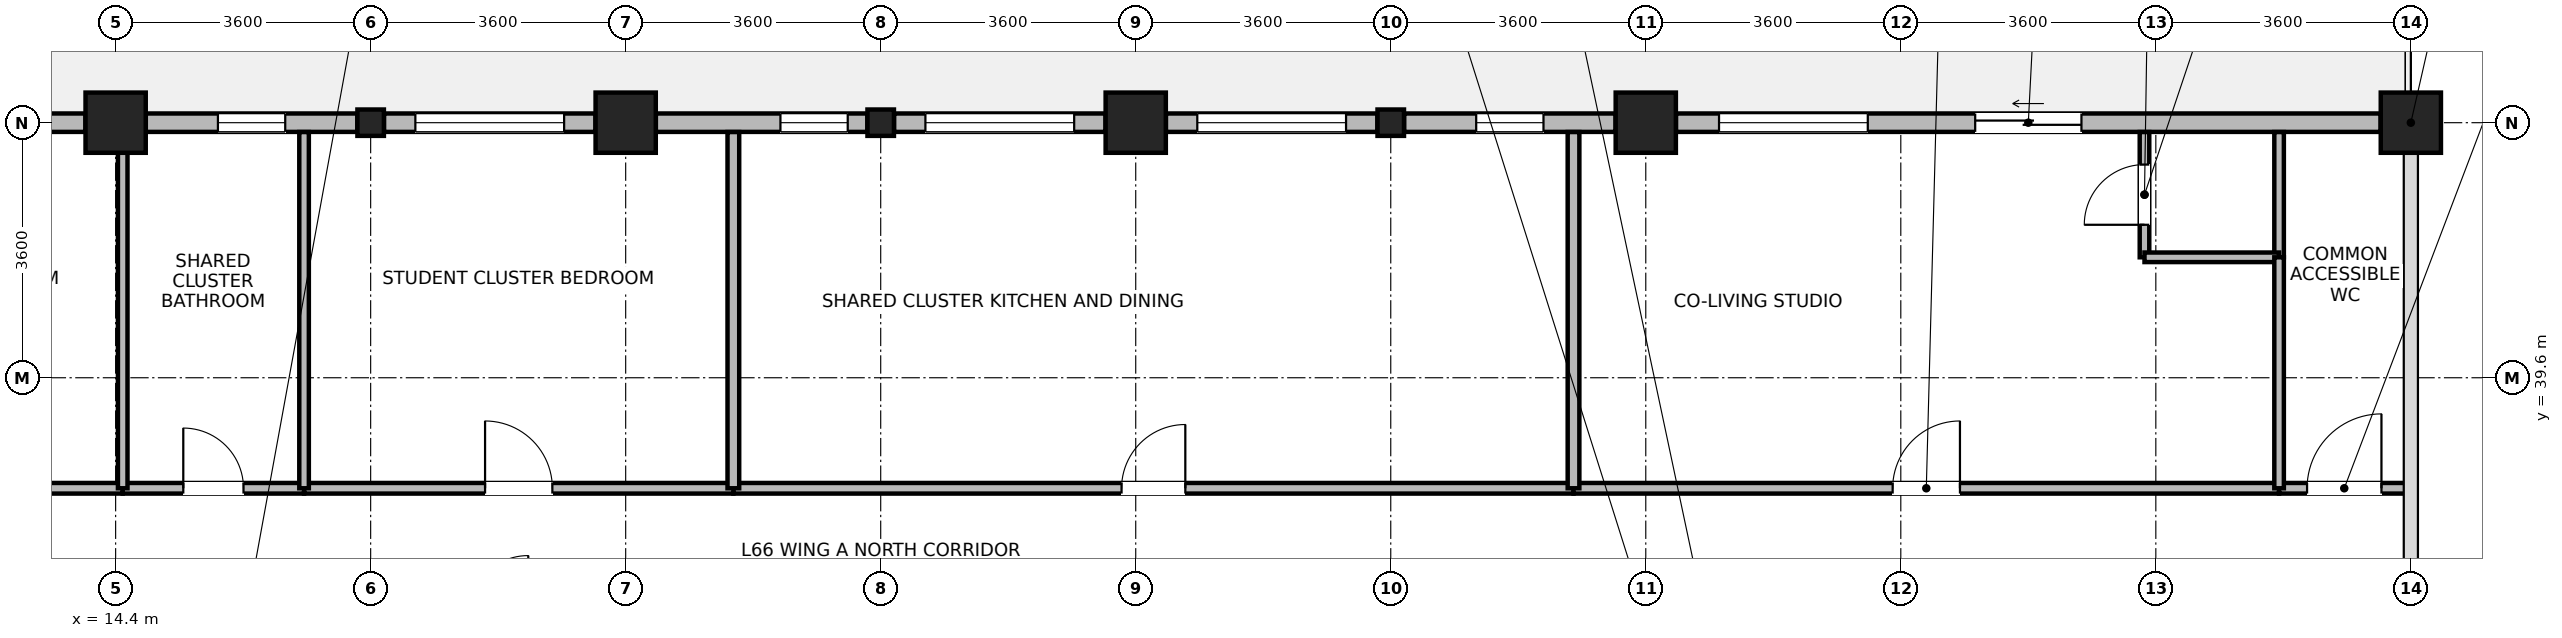
"""IFC4 building model, lengths in metres.
Left out: names, types, materials, properties, quantities, classifications, styles, units other than length and angle.
Written with IfcOpenShell. Run it as: python <this file> out.ifc"""

import sys

from ifc_helpers import new_model, si_unit, direction, frame, frame_2d, origin, origin_2d, place, context, subcontext, project, spatial, rectangle, i_section, extrude, source, transform, mapped, element, fill, save


model = new_model("IFC4")
c1 = context("Model", 3, precision=1e-05, world=origin(), true_north=direction((0.0, 1.0)))
c2 = subcontext(c1, "Body", "Model", "MODEL_VIEW")
j1 = project(units=[si_unit("LENGTHUNIT", "METRE"), si_unit("PLANEANGLEUNIT", "RADIAN")], contexts=[c1])
p1 = place(None, origin())
s1 = spatial("IfcSite", under=j1, at=p1, CompositionType="ELEMENT")
p2 = place(p1, origin())
s2 = spatial("IfcBuilding", under=s1, at=p2, CompositionType="ELEMENT")
p3 = place(p2, frame((0.0, 0.0, 257.3)))
s3 = spatial("IfcBuildingStorey", under=s2, at=p3, CompositionType="ELEMENT", Elevation=257.3)
m1 = source(origin(), c2, "Body", "SweptSolid", [
    extrude(rectangle(XDim=0.85, YDim=0.85, at=origin_2d()), origin(), (0.0, 0.0, 1.0), 3.7),
])
for number, where, z_axis, x_axis in (
    (1, (14.4, 43.2, 0.0), (0.0, 0.0, 1.0), (1.0, 0.0, 0.0)),
    (2, (21.6, 43.2, 0.0), (0.0, 0.0, 1.0), (1.0, 0.0, 0.0)),
    (3, (28.8, 43.2, 0.0), (0.0, 0.0, 1.0), (1.0, 0.0, 0.0)),
    (4, (36.0, 43.2, 0.0), (0.0, 0.0, 1.0), (1.0, 0.0, 0.0)),
    (5, (46.8, 43.2, 0.0), (0.0, 0.0, 1.0), (1.0, 0.0, 0.0)),
):
    element("IfcColumn", number, at=place(p3, frame(where, z_axis=z_axis, x_axis=x_axis)), inside=s3, PredefinedType="COLUMN", context=c2, shape_type="MappedRepresentation", body=[
        mapped(m1, transform((0.0, 0.0, 0.0), x_axis=(1.0, 0.0, 0.0), y_axis=(0.0, 1.0, 0.0), z_axis=(0.0, 0.0, 1.0), scale=1.0)),
    ])
m2 = source(origin(), c2, "Body", "SweptSolid", [
    extrude(i_section(OverallWidth=0.374, OverallDepth=0.372, WebThickness=0.015, FlangeThickness=0.026, FilletRadius=0.015, at=origin_2d()), origin(), (0.0, 0.0, 1.0), 3.7),
])
for number, where, z_axis, x_axis in (
    (6, (18.0, 43.2, 0.0), (0.0, 0.0, 1.0), (1.0, 0.0, 0.0)),
    (7, (25.2, 43.2, 0.0), (0.0, 0.0, 1.0), (1.0, 0.0, 0.0)),
    (8, (32.4, 43.2, 0.0), (0.0, 0.0, 1.0), (1.0, 0.0, 0.0)),
):
    element("IfcColumn", number, at=place(p3, frame(where, z_axis=z_axis, x_axis=x_axis)), inside=s3, PredefinedType="COLUMN", context=c2, shape_type="MappedRepresentation", body=[
        mapped(m2, transform((0.0, 0.0, 0.0), x_axis=(1.0, 0.0, 0.0), y_axis=(0.0, 1.0, 0.0), z_axis=(0.0, 0.0, 1.0), scale=1.0)),
    ])
p4 = place(p3, frame((36.426, 43.2, 0.0), z_axis=(0.0, 0.0, 1.0), x_axis=(1.0, 0.0, 0.0)))
e9 = element("IfcWall", 9, at=p4, inside=s3, PredefinedType="STANDARD", context=c2, shape_type="SweptSolid", body=[
    extrude(rectangle(XDim=9.948, YDim=0.26, at=frame_2d((4.974, 0.0))), origin(), (0.0, 0.0, 1.0), 3.055),
])
p5 = place(p4, frame((4.224, 0.0, 0.0)))
e10 = element("IfcOpeningElement", 10, at=p5, cuts=e9, PredefinedType="OPENING", context=c2, shape_type="SweptSolid", body=[
    extrude(rectangle(XDim=1.5, YDim=2.15, at=frame_2d((0.75, 1.075))), frame((0.0, 0.14, 0.0), z_axis=(0.0, -1.0, 0.0), x_axis=(1.0, 0.0, 0.0)), (0.0, 0.0, 1.0), 0.28),
])
p6 = place(p4, frame((0.608, 0.0, 0.85)))
e11 = element("IfcOpeningElement", 11, at=p6, cuts=e9, PredefinedType="OPENING", context=c2, shape_type="SweptSolid", body=[
    extrude(rectangle(XDim=2.1, YDim=1.95, at=frame_2d((1.05, 0.975))), frame((0.0, 0.14, 0.0), z_axis=(0.0, -1.0, 0.0), x_axis=(1.0, 0.0, 0.0)), (0.0, 0.0, 1.0), 0.28),
])
p7 = place(p3, frame((32.588, 43.2, 0.0), z_axis=(0.0, 0.0, 1.0), x_axis=(1.0, 0.0, 0.0)))
e12 = element("IfcWall", 12, at=p7, inside=s3, PredefinedType="STANDARD", context=c2, shape_type="SweptSolid", body=[
    extrude(rectangle(XDim=2.986, YDim=0.26, at=frame_2d((1.493, 0.0))), origin(), (0.0, 0.0, 1.0), 3.055),
])
p8 = place(p7, frame((1.018, 0.0, 0.85)))
e13 = element("IfcOpeningElement", 13, at=p8, cuts=e12, PredefinedType="OPENING", context=c2, shape_type="SweptSolid", body=[
    extrude(rectangle(XDim=0.95, YDim=1.75, at=frame_2d((0.475, 0.875))), frame((0.0, 0.14, 0.0), z_axis=(0.0, -1.0, 0.0), x_axis=(1.0, 0.0, 0.0)), (0.0, 0.0, 1.0), 0.28),
])
p9 = place(p3, frame((29.226, 43.2, 0.0), z_axis=(0.0, 0.0, 1.0), x_axis=(1.0, 0.0, 0.0)))
e14 = element("IfcWall", 14, at=p9, inside=s3, PredefinedType="STANDARD", context=c2, shape_type="SweptSolid", body=[
    extrude(rectangle(XDim=2.986, YDim=0.26, at=frame_2d((1.493, 0.0))), origin(), (0.0, 0.0, 1.0), 3.055),
])
p10 = place(p9, frame((0.443, 0.0, 0.85)))
e15 = element("IfcOpeningElement", 15, at=p10, cuts=e14, PredefinedType="OPENING", context=c2, shape_type="SweptSolid", body=[
    extrude(rectangle(XDim=2.1, YDim=1.95, at=frame_2d((1.05, 0.975))), frame((0.0, 0.14, 0.0), z_axis=(0.0, -1.0, 0.0), x_axis=(1.0, 0.0, 0.0)), (0.0, 0.0, 1.0), 0.28),
])
p11 = place(p3, frame((25.388, 43.2, 0.0), z_axis=(0.0, 0.0, 1.0), x_axis=(1.0, 0.0, 0.0)))
e16 = element("IfcWall", 16, at=p11, inside=s3, PredefinedType="STANDARD", context=c2, shape_type="SweptSolid", body=[
    extrude(rectangle(XDim=2.986, YDim=0.26, at=frame_2d((1.493, 0.0))), origin(), (0.0, 0.0, 1.0), 3.055),
])
p12 = place(p11, frame((0.443, 0.0, 0.85)))
e17 = element("IfcOpeningElement", 17, at=p12, cuts=e16, PredefinedType="OPENING", context=c2, shape_type="SweptSolid", body=[
    extrude(rectangle(XDim=2.1, YDim=1.95, at=frame_2d((1.05, 0.975))), frame((0.0, 0.14, 0.0), z_axis=(0.0, -1.0, 0.0), x_axis=(1.0, 0.0, 0.0)), (0.0, 0.0, 1.0), 0.28),
])
p13 = place(p3, frame((22.026, 43.2, 0.0), z_axis=(0.0, 0.0, 1.0), x_axis=(1.0, 0.0, 0.0)))
e18 = element("IfcWall", 18, at=p13, inside=s3, PredefinedType="STANDARD", context=c2, shape_type="SweptSolid", body=[
    extrude(rectangle(XDim=2.986, YDim=0.26, at=frame_2d((1.493, 0.0))), origin(), (0.0, 0.0, 1.0), 3.055),
])
p14 = place(p13, frame((1.759, 0.0, 0.85)))
e19 = element("IfcOpeningElement", 19, at=p14, cuts=e18, PredefinedType="OPENING", context=c2, shape_type="SweptSolid", body=[
    extrude(rectangle(XDim=0.95, YDim=1.75, at=frame_2d((0.475, 0.875))), frame((0.0, 0.14, 0.0), z_axis=(0.0, -1.0, 0.0), x_axis=(1.0, 0.0, 0.0)), (0.0, 0.0, 1.0), 0.28),
])
p15 = place(p3, frame((18.188, 43.2, 0.0), z_axis=(0.0, 0.0, 1.0), x_axis=(1.0, 0.0, 0.0)))
e20 = element("IfcWall", 20, at=p15, inside=s3, PredefinedType="STANDARD", context=c2, shape_type="SweptSolid", body=[
    extrude(rectangle(XDim=2.986, YDim=0.26, at=frame_2d((1.493, 0.0))), origin(), (0.0, 0.0, 1.0), 3.055),
])
p16 = place(p15, frame((0.443, 0.0, 0.85)))
e21 = element("IfcOpeningElement", 21, at=p16, cuts=e20, PredefinedType="OPENING", context=c2, shape_type="SweptSolid", body=[
    extrude(rectangle(XDim=2.1, YDim=1.95, at=frame_2d((1.05, 0.975))), frame((0.0, 0.14, 0.0), z_axis=(0.0, -1.0, 0.0), x_axis=(1.0, 0.0, 0.0)), (0.0, 0.0, 1.0), 0.28),
])
p17 = place(p3, frame((14.826, 43.2, 0.0), z_axis=(0.0, 0.0, 1.0), x_axis=(1.0, 0.0, 0.0)))
e22 = element("IfcWall", 22, at=p17, inside=s3, PredefinedType="STANDARD", context=c2, shape_type="SweptSolid", body=[
    extrude(rectangle(XDim=2.986, YDim=0.26, at=frame_2d((1.493, 0.0))), origin(), (0.0, 0.0, 1.0), 3.055),
])
p18 = place(p17, frame((1.018, 0.0, 0.85)))
e23 = element("IfcOpeningElement", 23, at=p18, cuts=e22, PredefinedType="OPENING", context=c2, shape_type="SweptSolid", body=[
    extrude(rectangle(XDim=0.95, YDim=1.75, at=frame_2d((0.475, 0.875))), frame((0.0, 0.14, 0.0), z_axis=(0.0, -1.0, 0.0), x_axis=(1.0, 0.0, 0.0)), (0.0, 0.0, 1.0), 0.28),
])
p19 = place(p3, frame((3.735, 43.2, 0.0), z_axis=(0.0, 0.0, 1.0), x_axis=(1.0, 0.0, 0.0)))
e24 = element("IfcWall", 24, at=p19, inside=s3, PredefinedType="STANDARD", context=c2, shape_type="SweptSolid", body=[
    extrude(rectangle(XDim=10.239, YDim=0.26, at=frame_2d((5.12, 0.0))), origin(), (0.0, 0.0, 1.0), 3.455),
])
p20 = place(p19, frame((0.656, 0.0, 0.85)))
e25 = element("IfcOpeningElement", 25, at=p20, cuts=e24, PredefinedType="OPENING", context=c2, shape_type="SweptSolid", body=[
    extrude(rectangle(XDim=2.1, YDim=1.95, at=frame_2d((1.05, 0.975))), frame((0.0, 0.14, 0.0), z_axis=(0.0, -1.0, 0.0), x_axis=(1.0, 0.0, 0.0)), (0.0, 0.0, 1.0), 0.28),
])
p21 = place(p19, frame((7.482, 0.0, 0.85)))
e26 = element("IfcOpeningElement", 26, at=p21, cuts=e24, PredefinedType="OPENING", context=c2, shape_type="SweptSolid", body=[
    extrude(rectangle(XDim=2.1, YDim=1.95, at=frame_2d((1.05, 0.975))), frame((0.0, 0.14, 0.0), z_axis=(0.0, -1.0, 0.0), x_axis=(1.0, 0.0, 0.0)), (0.0, 0.0, 1.0), 0.28),
])
p22 = place(p3, frame((43.04, 41.3, 0.0), z_axis=(0.0, 0.0, 1.0), x_axis=(0.0, 1.0, 0.0)))
e27 = element("IfcWall", 27, at=p22, inside=s3, PredefinedType="PARTITIONING", context=c2, shape_type="SweptSolid", body=[
    extrude(rectangle(XDim=1.768, YDim=0.135, at=frame_2d((0.884, 0.0))), origin(), (0.0, 0.0, 1.0), 3.455),
])
p23 = place(p22, frame((0.459, 0.0, 0.0)))
e28 = element("IfcOpeningElement", 28, at=p23, cuts=e27, PredefinedType="OPENING", context=c2, shape_type="SweptSolid", body=[
    extrude(rectangle(XDim=0.85, YDim=2.04, at=frame_2d((0.425, 1.02))), frame((0.0, 0.078, 0.0), z_axis=(0.0, -1.0, 0.0), x_axis=(1.0, 0.0, 0.0)), (0.0, 0.0, 1.0), 0.155),
])
p24 = place(p3, frame((44.94, 41.3, 0.0), z_axis=(0.0, 0.0, 1.0), x_axis=(0.0, 1.0, 0.0)))
e29 = element("IfcWall", 29, at=p24, inside=s3, PredefinedType="PARTITIONING", context=c2, shape_type="SweptSolid", body=[
    extrude(rectangle(XDim=1.768, YDim=0.135, at=frame_2d((0.884, 0.0))), origin(), (0.0, 0.0, 1.0), 3.455),
])
p25 = place(p3, frame((43.04, 41.3, 0.0), z_axis=(0.0, 0.0, 1.0), x_axis=(1.0, 0.0, 0.0)))
e30 = element("IfcWall", 30, at=p25, inside=s3, PredefinedType="PARTITIONING", context=c2, shape_type="SweptSolid", body=[
    extrude(rectangle(XDim=1.9, YDim=0.135, at=frame_2d((0.95, 0.0))), origin(), (0.0, 0.0, 1.0), 3.455),
])
p26 = place(p3, frame((23.12, 38.04, 0.0), z_axis=(0.0, 0.0, 1.0), x_axis=(1.0, 0.0, 0.0)))
e31 = element("IfcWall", 31, at=p26, inside=s3, PredefinedType="PARTITIONING", context=c2, shape_type="SweptSolid", body=[
    extrude(rectangle(XDim=11.86, YDim=0.15, at=frame_2d((5.93, 0.0))), origin(), (0.0, 0.0, 1.0), 3.455),
])
p27 = place(p26, frame((5.48, 0.0, 0.0)))
e32 = element("IfcOpeningElement", 32, at=p27, cuts=e31, PredefinedType="OPENING", context=c2, shape_type="SweptSolid", body=[
    extrude(rectangle(XDim=0.9, YDim=2.08, at=frame_2d((0.45, 1.04))), frame((0.0, 0.085, 0.0), z_axis=(0.0, -1.0, 0.0), x_axis=(1.0, 0.0, 0.0)), (0.0, 0.0, 1.0), 0.17),
])
p28 = place(p3, frame((34.98, 38.04, 0.0), z_axis=(0.0, 0.0, 1.0), x_axis=(1.0, 0.0, 0.0)))
e33 = element("IfcWall", 33, at=p28, inside=s3, PredefinedType="PARTITIONING", context=c2, shape_type="SweptSolid", body=[
    extrude(rectangle(XDim=9.96, YDim=0.15, at=frame_2d((4.98, 0.0))), origin(), (0.0, 0.0, 1.0), 3.455),
])
p29 = place(p28, frame((4.505, 0.0, 0.0)))
e34 = element("IfcOpeningElement", 34, at=p29, cuts=e33, PredefinedType="OPENING", context=c2, shape_type="SweptSolid", body=[
    extrude(rectangle(XDim=0.95, YDim=2.1, at=frame_2d((0.475, 1.05))), frame((0.0, 0.085, 0.0), z_axis=(0.0, -1.0, 0.0), x_axis=(1.0, 0.0, 0.0)), (0.0, 0.0, 1.0), 0.17),
])
p30 = place(p3, frame((17.06, 38.04, 0.0), z_axis=(0.0, 0.0, 1.0), x_axis=(1.0, 0.0, 0.0)))
e35 = element("IfcWall", 35, at=p30, inside=s3, PredefinedType="PARTITIONING", context=c2, shape_type="SweptSolid", body=[
    extrude(rectangle(XDim=6.06, YDim=0.15, at=frame_2d((3.03, 0.0))), origin(), (0.0, 0.0, 1.0), 3.455),
])
p31 = place(p30, frame((2.555, 0.0, 0.0)))
e36 = element("IfcOpeningElement", 36, at=p31, cuts=e35, PredefinedType="OPENING", context=c2, shape_type="SweptSolid", body=[
    extrude(rectangle(XDim=0.95, YDim=2.1, at=frame_2d((0.475, 1.05))), frame((0.0, 0.085, 0.0), z_axis=(0.0, -1.0, 0.0), x_axis=(1.0, 0.0, 0.0)), (0.0, 0.0, 1.0), 0.17),
])
p32 = place(p3, frame((8.84, 38.04, 0.0), z_axis=(0.0, 0.0, 1.0), x_axis=(1.0, 0.0, 0.0)))
e37 = element("IfcWall", 37, at=p32, inside=s3, PredefinedType="PARTITIONING", context=c2, shape_type="SweptSolid", body=[
    extrude(rectangle(XDim=5.66, YDim=0.15, at=frame_2d((2.83, 0.0))), origin(), (0.0, 0.0, 1.0), 3.455),
])
p33 = place(p32, frame((2.355, 0.0, 0.0)))
e38 = element("IfcOpeningElement", 38, at=p33, cuts=e37, PredefinedType="OPENING", context=c2, shape_type="SweptSolid", body=[
    extrude(rectangle(XDim=0.95, YDim=2.1, at=frame_2d((0.475, 1.05))), frame((0.0, 0.085, 0.0), z_axis=(0.0, -1.0, 0.0), x_axis=(1.0, 0.0, 0.0)), (0.0, 0.0, 1.0), 0.17),
])
p34 = place(p3, frame((14.5, 38.04, 0.0), z_axis=(0.0, 0.0, 1.0), x_axis=(1.0, 0.0, 0.0)))
e39 = element("IfcWall", 39, at=p34, inside=s3, PredefinedType="PARTITIONING", context=c2, shape_type="SweptSolid", body=[
    extrude(rectangle(XDim=2.56, YDim=0.15, at=frame_2d((1.28, 0.0))), origin(), (0.0, 0.0, 1.0), 3.455),
])
p35 = place(p34, frame((0.855, 0.0, 0.0)))
e40 = element("IfcOpeningElement", 40, at=p35, cuts=e39, PredefinedType="OPENING", context=c2, shape_type="SweptSolid", body=[
    extrude(rectangle(XDim=0.85, YDim=2.04, at=frame_2d((0.425, 1.02))), frame((0.0, 0.085, 0.0), z_axis=(0.0, -1.0, 0.0), x_axis=(1.0, 0.0, 0.0)), (0.0, 0.0, 1.0), 0.17),
])
p36 = place(p3, frame((44.94, 38.04, 0.0), z_axis=(0.0, 0.0, 1.0), x_axis=(1.0, 0.0, 0.0)))
e41 = element("IfcWall", 41, at=p36, inside=s3, PredefinedType="PARTITIONING", context=c2, shape_type="SweptSolid", body=[
    extrude(rectangle(XDim=1.84, YDim=0.15, at=frame_2d((0.92, 0.0))), origin(), (0.0, 0.0, 1.0), 3.455),
])
p37 = place(p36, frame((0.395, 0.0, 0.0)))
e42 = element("IfcOpeningElement", 42, at=p37, cuts=e41, PredefinedType="OPENING", context=c2, shape_type="SweptSolid", body=[
    extrude(rectangle(XDim=1.05, YDim=2.12, at=frame_2d((0.525, 1.06))), frame((0.0, 0.085, 0.0), z_axis=(0.0, -1.0, 0.0), x_axis=(1.0, 0.0, 0.0)), (0.0, 0.0, 1.0), 0.17),
])
p38 = place(p3, frame((14.5, 38.04, 0.0), z_axis=(0.0, 0.0, 1.0), x_axis=(0.0, 1.0, 0.0)))
e43 = element("IfcWall", 43, at=p38, inside=s3, PredefinedType="PARTITIONING", context=c2, shape_type="SweptSolid", body=[
    extrude(rectangle(XDim=5.028, YDim=0.135, at=frame_2d((2.514, 0.0))), origin(), (0.0, 0.0, 1.0), 3.055),
])
p39 = place(p3, frame((17.06, 38.04, 0.0), z_axis=(0.0, 0.0, 1.0), x_axis=(0.0, 1.0, 0.0)))
e44 = element("IfcWall", 44, at=p39, inside=s3, PredefinedType="PARTITIONING", context=c2, shape_type="SweptSolid", body=[
    extrude(rectangle(XDim=5.028, YDim=0.135, at=frame_2d((2.514, 0.0))), origin(), (0.0, 0.0, 1.0), 3.455),
])
for number, where, z_axis, x_axis in (
    (45, (23.12, 38.04, 0.0), (0.0, 0.0, 1.0), (0.0, 1.0, 0.0)),
    (46, (34.98, 38.04, 0.0), (0.0, 0.0, 1.0), (0.0, 1.0, 0.0)),
):
    element("IfcWall", number, at=place(p3, frame(where, z_axis=z_axis, x_axis=x_axis)), inside=s3, PredefinedType="PARTITIONING", context=c2, shape_type="SweptSolid", body=[
        extrude(rectangle(XDim=5.028, YDim=0.165, at=frame_2d((2.514, 0.0))), origin(), (0.0, 0.0, 1.0), 3.455),
    ])
p40 = place(p3, frame((44.94, 38.04, 0.0), z_axis=(0.0, 0.0, 1.0), x_axis=(0.0, 1.0, 0.0)))
e47 = element("IfcWall", 47, at=p40, inside=s3, PredefinedType="PARTITIONING", context=c2, shape_type="SweptSolid", body=[
    extrude(rectangle(XDim=3.26, YDim=0.135, at=frame_2d((1.63, 0.0))), origin(), (0.0, 0.0, 1.0), 3.455),
])
p41 = place(p5, origin())
e48 = element("IfcDoor", 48, at=p41, inside=s3, OperationType="SLIDING_TO_LEFT", PredefinedType="DOOR", context=c2, shape_type="SweptSolid", body=[
    extrude(rectangle(XDim=1.5, YDim=2.15, at=frame_2d((0.75, 1.075))), frame((0.0, 0.025, 0.0), z_axis=(0.0, -1.0, 0.0), x_axis=(1.0, 0.0, 0.0)), (0.0, 0.0, 1.0), 0.05),
])
fill(e10, e48)
p42 = place(p6, origin())
e49 = element("IfcWindow", 49, at=p42, inside=s3, PartitioningType="SINGLE_PANEL", PredefinedType="WINDOW", context=c2, shape_type="SweptSolid", body=[
    extrude(rectangle(XDim=2.1, YDim=1.95, at=frame_2d((1.05, 0.975))), frame((0.0, 0.03, 0.0), z_axis=(0.0, -1.0, 0.0), x_axis=(1.0, 0.0, 0.0)), (0.0, 0.0, 1.0), 0.06),
])
fill(e11, e49)
p43 = place(p8, origin())
e50 = element("IfcWindow", 50, at=p43, inside=s3, PartitioningType="SINGLE_PANEL", PredefinedType="WINDOW", context=c2, shape_type="SweptSolid", body=[
    extrude(rectangle(XDim=0.95, YDim=1.75, at=frame_2d((0.475, 0.875))), frame((0.0, 0.03, 0.0), z_axis=(0.0, -1.0, 0.0), x_axis=(1.0, 0.0, 0.0)), (0.0, 0.0, 1.0), 0.06),
])
fill(e13, e50)
p44 = place(p10, origin())
e51 = element("IfcWindow", 51, at=p44, inside=s3, PartitioningType="SINGLE_PANEL", PredefinedType="WINDOW", context=c2, shape_type="SweptSolid", body=[
    extrude(rectangle(XDim=2.1, YDim=1.95, at=frame_2d((1.05, 0.975))), frame((0.0, 0.03, 0.0), z_axis=(0.0, -1.0, 0.0), x_axis=(1.0, 0.0, 0.0)), (0.0, 0.0, 1.0), 0.06),
])
fill(e15, e51)
p45 = place(p12, origin())
e52 = element("IfcWindow", 52, at=p45, inside=s3, PartitioningType="SINGLE_PANEL", PredefinedType="WINDOW", context=c2, shape_type="SweptSolid", body=[
    extrude(rectangle(XDim=2.1, YDim=1.95, at=frame_2d((1.05, 0.975))), frame((0.0, 0.03, 0.0), z_axis=(0.0, -1.0, 0.0), x_axis=(1.0, 0.0, 0.0)), (0.0, 0.0, 1.0), 0.06),
])
fill(e17, e52)
p46 = place(p14, origin())
e53 = element("IfcWindow", 53, at=p46, inside=s3, PartitioningType="SINGLE_PANEL", PredefinedType="WINDOW", context=c2, shape_type="SweptSolid", body=[
    extrude(rectangle(XDim=0.95, YDim=1.75, at=frame_2d((0.475, 0.875))), frame((0.0, 0.03, 0.0), z_axis=(0.0, -1.0, 0.0), x_axis=(1.0, 0.0, 0.0)), (0.0, 0.0, 1.0), 0.06),
])
fill(e19, e53)
p47 = place(p16, origin())
e54 = element("IfcWindow", 54, at=p47, inside=s3, PartitioningType="SINGLE_PANEL", PredefinedType="WINDOW", context=c2, shape_type="SweptSolid", body=[
    extrude(rectangle(XDim=2.1, YDim=1.95, at=frame_2d((1.05, 0.975))), frame((0.0, 0.03, 0.0), z_axis=(0.0, -1.0, 0.0), x_axis=(1.0, 0.0, 0.0)), (0.0, 0.0, 1.0), 0.06),
])
fill(e21, e54)
p48 = place(p18, origin())
e55 = element("IfcWindow", 55, at=p48, inside=s3, PartitioningType="SINGLE_PANEL", PredefinedType="WINDOW", context=c2, shape_type="SweptSolid", body=[
    extrude(rectangle(XDim=0.95, YDim=1.75, at=frame_2d((0.475, 0.875))), frame((0.0, 0.03, 0.0), z_axis=(0.0, -1.0, 0.0), x_axis=(1.0, 0.0, 0.0)), (0.0, 0.0, 1.0), 0.06),
])
fill(e23, e55)
p49 = place(p23, origin())
e56 = element("IfcDoor", 56, at=p49, inside=s3, OperationType="SINGLE_SWING_LEFT", PredefinedType="DOOR", context=c2, shape_type="SweptSolid", body=[
    extrude(rectangle(XDim=0.85, YDim=2.04, at=frame_2d((0.425, 1.02))), frame((0.0, 0.025, 0.0), z_axis=(0.0, -1.0, 0.0), x_axis=(1.0, 0.0, 0.0)), (0.0, 0.0, 1.0), 0.05),
])
fill(e28, e56)
p50 = place(p27, origin())
e57 = element("IfcDoor", 57, at=p50, inside=s3, OperationType="SINGLE_SWING_RIGHT", PredefinedType="DOOR", context=c2, shape_type="SweptSolid", body=[
    extrude(rectangle(XDim=0.9, YDim=2.08, at=frame_2d((0.45, 1.04))), frame((0.0, 0.025, 0.0), z_axis=(0.0, -1.0, 0.0), x_axis=(1.0, 0.0, 0.0)), (0.0, 0.0, 1.0), 0.05),
])
fill(e32, e57)
p51 = place(p29, origin())
e58 = element("IfcDoor", 58, at=p51, inside=s3, OperationType="SINGLE_SWING_RIGHT", PredefinedType="DOOR", context=c2, shape_type="SweptSolid", body=[
    extrude(rectangle(XDim=0.95, YDim=2.1, at=frame_2d((0.475, 1.05))), frame((0.0, 0.025, 0.0), z_axis=(0.0, -1.0, 0.0), x_axis=(1.0, 0.0, 0.0)), (0.0, 0.0, 1.0), 0.05),
])
fill(e34, e58)
p52 = place(p31, origin())
e59 = element("IfcDoor", 59, at=p52, inside=s3, OperationType="SINGLE_SWING_LEFT", PredefinedType="DOOR", context=c2, shape_type="SweptSolid", body=[
    extrude(rectangle(XDim=0.95, YDim=2.1, at=frame_2d((0.475, 1.05))), frame((0.0, 0.025, 0.0), z_axis=(0.0, -1.0, 0.0), x_axis=(1.0, 0.0, 0.0)), (0.0, 0.0, 1.0), 0.05),
])
fill(e36, e59)
p53 = place(p35, origin())
e60 = element("IfcDoor", 60, at=p53, inside=s3, OperationType="SINGLE_SWING_LEFT", PredefinedType="DOOR", context=c2, shape_type="SweptSolid", body=[
    extrude(rectangle(XDim=0.85, YDim=2.04, at=frame_2d((0.425, 1.02))), frame((0.0, 0.025, 0.0), z_axis=(0.0, -1.0, 0.0), x_axis=(1.0, 0.0, 0.0)), (0.0, 0.0, 1.0), 0.05),
])
fill(e40, e60)
p54 = place(p37, origin())
e61 = element("IfcDoor", 61, at=p54, inside=s3, OperationType="SINGLE_SWING_RIGHT", PredefinedType="DOOR", context=c2, shape_type="SweptSolid", body=[
    extrude(rectangle(XDim=1.05, YDim=2.12, at=frame_2d((0.525, 1.06))), frame((0.0, 0.025, 0.0), z_axis=(0.0, -1.0, 0.0), x_axis=(1.0, 0.0, 0.0)), (0.0, 0.0, 1.0), 0.05),
])
fill(e42, e61)
save(model, sys.argv[1])
